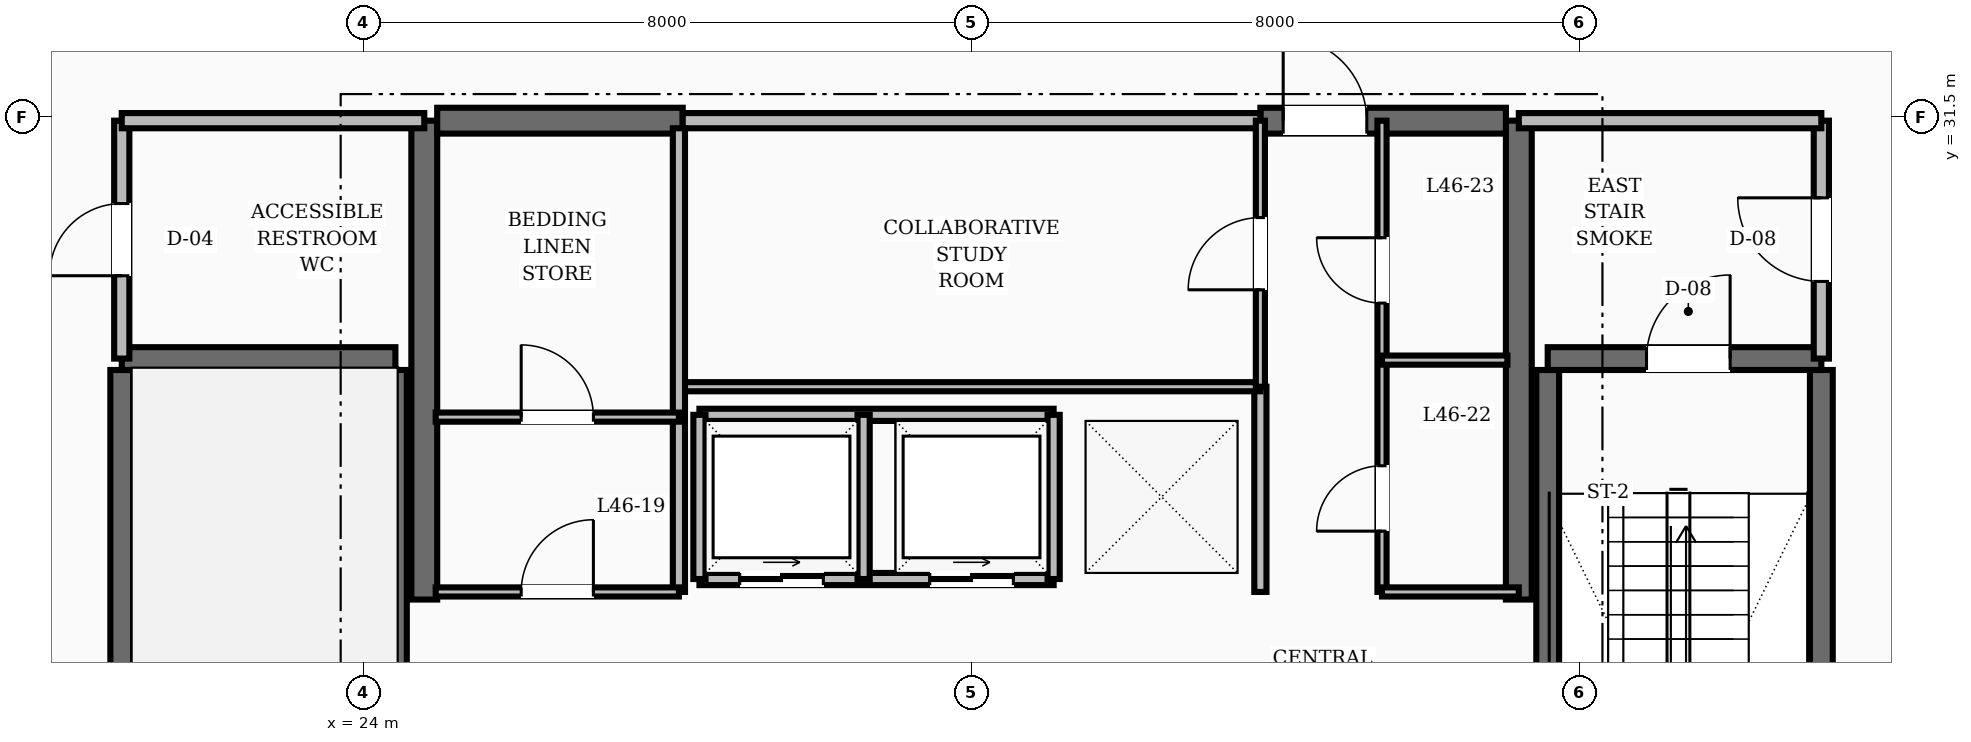
"""IFC4 building model, lengths in metres.
Left out: names, types, materials, properties, quantities, classifications, styles, units other than length and angle.
Written with IfcOpenShell. Run it as: python <this file> out.ifc"""

import sys

from ifc_helpers import new_model, si_unit, direction, frame, frame_2d, origin, place, context, subcontext, project, spatial, rectangle, extrude, element, fill, save


model = new_model("IFC4")
c1 = context("Model", 3, precision=1e-05, world=origin(), true_north=direction((0.0, 1.0)))
c2 = subcontext(c1, "Body", "Model", "MODEL_VIEW")
j1 = project(units=[si_unit("LENGTHUNIT", "METRE"), si_unit("PLANEANGLEUNIT", "RADIAN")], contexts=[c1])
p1 = place(None, origin())
s1 = spatial("IfcSite", under=j1, at=p1, CompositionType="ELEMENT")
p2 = place(p1, origin())
s2 = spatial("IfcBuilding", under=s1, at=p2, CompositionType="ELEMENT")
p3 = place(p2, frame((0.0, 0.0, 178.4)))
s3 = spatial("IfcBuildingStorey", under=s2, at=p3, CompositionType="ELEMENT", Elevation=178.4)
for number, where, z_axis, x_axis in (
    (1, (24.8, 25.15, 0.0), (0.0, 0.0, 1.0), (0.0, 1.0, 0.0)),
    (2, (39.2, 25.15, 0.0), (0.0, 0.0, 1.0), (0.0, 1.0, 0.0)),
):
    element("IfcWall", number, at=place(p3, frame(where, z_axis=z_axis, x_axis=x_axis)), inside=s3, PredefinedType="SHEAR", context=c2, shape_type="SweptSolid", body=[
        extrude(rectangle(XDim=6.3, YDim=0.34, at=frame_2d((3.15, 0.0))), origin(), (0.0, 0.0, 1.0), 3.6),
    ])
p4 = place(p3, frame((24.97, 31.45, 0.0), z_axis=(0.0, 0.0, 1.0), x_axis=(1.0, 0.0, 0.0)))
e3 = element("IfcWall", 3, at=p4, inside=s3, PredefinedType="SHEAR", context=c2, shape_type="SweptSolid", body=[
    extrude(rectangle(XDim=3.23, YDim=0.34, at=frame_2d((1.615, 0.0))), origin(), (0.0, 0.0, 1.0), 3.6),
])
p5 = place(p3, frame((35.8, 31.45, 0.0), z_axis=(0.0, 0.0, 1.0), x_axis=(1.0, 0.0, 0.0)))
e4 = element("IfcWall", 4, at=p5, inside=s3, PredefinedType="SHEAR", context=c2, shape_type="SweptSolid", body=[
    extrude(rectangle(XDim=3.23, YDim=0.34, at=frame_2d((1.615, 0.0))), origin(), (0.0, 0.0, 1.0), 3.6),
])
p6 = place(p5, frame((0.3, 0.0, 0.0)))
e5 = element("IfcOpeningElement", 5, at=p6, cuts=e4, PredefinedType="OPENING", context=c2, shape_type="SweptSolid", body=[
    extrude(rectangle(XDim=1.1, YDim=2.1, at=frame_2d((0.55, 1.05))), frame((0.0, 0.18, 0.0), z_axis=(0.0, -1.0, 0.0), x_axis=(1.0, 0.0, 0.0)), (0.0, 0.0, 1.0), 0.36),
])
for number, where, z_axis, x_axis in (
    (6, (20.82, 19.43, 0.0), (0.0, 0.0, 1.0), (0.0, 1.0, 0.0)),
    (7, (24.42, 19.43, 0.0), (0.0, 0.0, 1.0), (0.0, 1.0, 0.0)),
):
    element("IfcWall", number, at=place(p3, frame(where, z_axis=z_axis, x_axis=x_axis)), inside=s3, PredefinedType="SHEAR", context=c2, shape_type="SweptSolid", body=[
        extrude(rectangle(XDim=8.74, YDim=0.3, at=frame_2d((4.37, 0.0))), origin(), (0.0, 0.0, 1.0), 3.6),
    ])
p7 = place(p3, frame((20.82, 28.32, 0.0), z_axis=(0.0, 0.0, 1.0), x_axis=(1.0, 0.0, 0.0)))
e8 = element("IfcWall", 8, at=p7, inside=s3, PredefinedType="SHEAR", context=c2, shape_type="SweptSolid", body=[
    extrude(rectangle(XDim=3.6, YDim=0.3, at=frame_2d((1.8, 0.0))), origin(), (0.0, 0.0, 1.0), 3.6),
])
for number, where, z_axis, x_axis in (
    (9, (43.18, 19.43, 0.0), (0.0, 0.0, 1.0), (0.0, 1.0, 0.0)),
    (10, (39.58, 19.43, 0.0), (0.0, 0.0, 1.0), (0.0, 1.0, 0.0)),
):
    element("IfcWall", number, at=place(p3, frame(where, z_axis=z_axis, x_axis=x_axis)), inside=s3, PredefinedType="SHEAR", context=c2, shape_type="SweptSolid", body=[
        extrude(rectangle(XDim=8.74, YDim=0.3, at=frame_2d((4.37, 0.0))), origin(), (0.0, 0.0, 1.0), 3.6),
    ])
p8 = place(p3, frame((39.58, 28.32, 0.0), z_axis=(0.0, 0.0, 1.0), x_axis=(1.0, 0.0, 0.0)))
e11 = element("IfcWall", 11, at=p8, inside=s3, PredefinedType="SHEAR", context=c2, shape_type="SweptSolid", body=[
    extrude(rectangle(XDim=3.6, YDim=0.3, at=frame_2d((1.8, 0.0))), origin(), (0.0, 0.0, 1.0), 3.6),
])
p9 = place(p8, frame((1.3, 0.0, 0.0)))
e12 = element("IfcOpeningElement", 12, at=p9, cuts=e11, PredefinedType="OPENING", context=c2, shape_type="SweptSolid", body=[
    extrude(rectangle(XDim=1.1, YDim=2.1, at=frame_2d((0.55, 1.05))), frame((0.0, 0.16, 0.0), z_axis=(0.0, -1.0, 0.0), x_axis=(1.0, 0.0, 0.0)), (0.0, 0.0, 1.0), 0.32),
])
p10 = place(p3, frame((43.18, 28.32, 0.0), z_axis=(0.0, 0.0, 1.0), x_axis=(0.0, 1.0, 0.0)))
e13 = element("IfcWall", 13, at=p10, inside=s3, PredefinedType="SOLIDWALL", context=c2, shape_type="SweptSolid", body=[
    extrude(rectangle(XDim=3.13, YDim=0.2, at=frame_2d((1.565, 0.0))), origin(), (0.0, 0.0, 1.0), 2.8),
])
p11 = place(p10, frame((1.015, 0.0, 0.0)))
e14 = element("IfcOpeningElement", 14, at=p11, cuts=e13, PredefinedType="OPENING", context=c2, shape_type="SweptSolid", body=[
    extrude(rectangle(XDim=1.1, YDim=2.1, at=frame_2d((0.55, 1.05))), frame((0.0, 0.11, 0.0), z_axis=(0.0, -1.0, 0.0), x_axis=(1.0, 0.0, 0.0)), (0.0, 0.0, 1.0), 0.22),
])
p12 = place(p3, frame((39.2, 31.45, 0.0), z_axis=(0.0, 0.0, 1.0), x_axis=(1.0, 0.0, 0.0)))
e15 = element("IfcWall", 15, at=p12, inside=s3, PredefinedType="SOLIDWALL", context=c2, shape_type="SweptSolid", body=[
    extrude(rectangle(XDim=3.98, YDim=0.2, at=frame_2d((1.99, 0.0))), origin(), (0.0, 0.0, 1.0), 2.8),
])
p13 = place(p3, frame((20.82, 28.32, 0.0), z_axis=(0.0, 0.0, 1.0), x_axis=(0.0, 1.0, 0.0)))
e16 = element("IfcWall", 16, at=p13, inside=s3, PredefinedType="SOLIDWALL", context=c2, shape_type="SweptSolid", body=[
    extrude(rectangle(XDim=3.13, YDim=0.2, at=frame_2d((1.565, 0.0))), origin(), (0.0, 0.0, 1.0), 2.8),
])
p14 = place(p13, frame((1.09, 0.0, 0.0)))
e17 = element("IfcOpeningElement", 17, at=p14, cuts=e16, PredefinedType="OPENING", context=c2, shape_type="SweptSolid", body=[
    extrude(rectangle(XDim=0.95, YDim=2.1, at=frame_2d((0.475, 1.05))), frame((0.0, 0.11, 0.0), z_axis=(0.0, -1.0, 0.0), x_axis=(1.0, 0.0, 0.0)), (0.0, 0.0, 1.0), 0.22),
])
p15 = place(p3, frame((20.82, 31.45, 0.0), z_axis=(0.0, 0.0, 1.0), x_axis=(1.0, 0.0, 0.0)))
e18 = element("IfcWall", 18, at=p15, inside=s3, PredefinedType="SOLIDWALL", context=c2, shape_type="SweptSolid", body=[
    extrude(rectangle(XDim=3.98, YDim=0.2, at=frame_2d((1.99, 0.0))), origin(), (0.0, 0.0, 1.0), 2.8),
])
p16 = place(p3, frame((35.8, 25.25, 0.0), z_axis=(0.0, 0.0, 1.0), x_axis=(0.0, 1.0, 0.0)))
e19 = element("IfcWall", 19, at=p16, inside=s3, PredefinedType="SOLIDWALL", context=c2, shape_type="SweptSolid", body=[
    extrude(rectangle(XDim=2.7, YDim=0.16, at=frame_2d((1.35, 0.0))), origin(), (0.0, 0.0, 1.0), 2.8),
])
p17 = place(p3, frame((28.42, 25.42, 0.0), z_axis=(0.0, 0.0, 1.0), x_axis=(1.0, 0.0, 0.0)))
e20 = element("IfcWall", 20, at=p17, inside=s3, PredefinedType="SOLIDWALL", context=c2, shape_type="SweptSolid", body=[
    extrude(rectangle(XDim=4.66, YDim=0.16, at=frame_2d((2.33, 0.0))), origin(), (0.0, 0.0, 1.0), 2.8),
])
p18 = place(p17, frame((0.53, 0.0, 0.0)))
e21 = element("IfcOpeningElement", 21, at=p18, cuts=e20, PredefinedType="OPENING", context=c2, shape_type="SweptSolid", body=[
    extrude(rectangle(XDim=1.1, YDim=2.15, at=frame_2d((0.55, 1.075))), frame((0.0, 0.09, 0.0), z_axis=(0.0, -1.0, 0.0), x_axis=(1.0, 0.0, 0.0)), (0.0, 0.0, 1.0), 0.18),
])
p19 = place(p17, frame((3.03, 0.0, 0.0)))
e22 = element("IfcOpeningElement", 22, at=p19, cuts=e20, PredefinedType="OPENING", context=c2, shape_type="SweptSolid", body=[
    extrude(rectangle(XDim=1.1, YDim=2.15, at=frame_2d((0.55, 1.075))), frame((0.0, 0.09, 0.0), z_axis=(0.0, -1.0, 0.0), x_axis=(1.0, 0.0, 0.0)), (0.0, 0.0, 1.0), 0.18),
])
p20 = place(p3, frame((28.42, 27.58, 0.0), z_axis=(0.0, 0.0, 1.0), x_axis=(1.0, 0.0, 0.0)))
e23 = element("IfcWall", 23, at=p20, inside=s3, PredefinedType="SOLIDWALL", context=c2, shape_type="SweptSolid", body=[
    extrude(rectangle(XDim=4.66, YDim=0.16, at=frame_2d((2.33, 0.0))), origin(), (0.0, 0.0, 1.0), 2.8),
])
for number, where, z_axis, x_axis in (
    (24, (28.42, 25.42, 0.0), (0.0, 0.0, 1.0), (0.0, 1.0, 0.0)),
    (25, (30.58, 25.42, 0.0), (0.0, 0.0, 1.0), (0.0, 1.0, 0.0)),
    (26, (33.08, 25.42, 0.0), (0.0, 0.0, 1.0), (0.0, 1.0, 0.0)),
):
    element("IfcWall", number, at=place(p3, frame(where, z_axis=z_axis, x_axis=x_axis)), inside=s3, PredefinedType="SOLIDWALL", context=c2, shape_type="SweptSolid", body=[
        extrude(rectangle(XDim=2.16, YDim=0.16, at=frame_2d((1.08, 0.0))), origin(), (0.0, 0.0, 1.0), 2.8),
    ])
p21 = place(p3, frame((28.2, 31.45, 0.0), z_axis=(0.0, 0.0, 1.0), x_axis=(1.0, 0.0, 0.0)))
e27 = element("IfcWall", 27, at=p21, inside=s3, PredefinedType="SOLIDWALL", context=c2, shape_type="SweptSolid", body=[
    extrude(rectangle(XDim=7.6, YDim=0.2, at=frame_2d((3.8, 0.0))), origin(), (0.0, 0.0, 1.0), 2.8),
])
p22 = place(p3, frame((28.2, 27.95, 0.0), z_axis=(0.0, 0.0, 1.0), x_axis=(1.0, 0.0, 0.0)))
e28 = element("IfcWall", 28, at=p22, inside=s3, PredefinedType="PARTITIONING", context=c2, shape_type="SweptSolid", body=[
    extrude(rectangle(XDim=7.6, YDim=0.12, at=frame_2d((3.8, 0.0))), origin(), (0.0, 0.0, 1.0), 2.8),
])
p23 = place(p3, frame((35.8, 27.95, 0.0), z_axis=(0.0, 0.0, 1.0), x_axis=(0.0, 1.0, 0.0)))
e29 = element("IfcWall", 29, at=p23, inside=s3, PredefinedType="PARTITIONING", context=c2, shape_type="SweptSolid", body=[
    extrude(rectangle(XDim=3.5, YDim=0.12, at=frame_2d((1.75, 0.0))), origin(), (0.0, 0.0, 1.0), 2.8),
])
p24 = place(p23, frame((1.275, 0.0, 0.0)))
e30 = element("IfcOpeningElement", 30, at=p24, cuts=e29, PredefinedType="OPENING", context=c2, shape_type="SweptSolid", body=[
    extrude(rectangle(XDim=0.95, YDim=2.1, at=frame_2d((0.475, 1.05))), frame((0.0, 0.07, 0.0), z_axis=(0.0, -1.0, 0.0), x_axis=(1.0, 0.0, 0.0)), (0.0, 0.0, 1.0), 0.14),
])
p25 = place(p3, frame((28.15, 25.25, 0.0), z_axis=(0.0, 0.0, 1.0), x_axis=(0.0, 1.0, 0.0)))
e31 = element("IfcWall", 31, at=p25, inside=s3, PredefinedType="SOLIDWALL", context=c2, shape_type="SweptSolid", body=[
    extrude(rectangle(XDim=6.1, YDim=0.16, at=frame_2d((3.05, 0.0))), origin(), (0.0, 0.0, 1.0), 2.8),
])
p26 = place(p3, frame((24.95, 25.25, 0.0), z_axis=(0.0, 0.0, 1.0), x_axis=(1.0, 0.0, 0.0)))
e32 = element("IfcWall", 32, at=p26, inside=s3, PredefinedType="PARTITIONING", context=c2, shape_type="SweptSolid", body=[
    extrude(rectangle(XDim=3.2, YDim=0.12, at=frame_2d((1.6, 0.0))), origin(), (0.0, 0.0, 1.0), 2.8),
])
p27 = place(p26, frame((1.125, 0.0, 0.0)))
e33 = element("IfcOpeningElement", 33, at=p27, cuts=e32, PredefinedType="OPENING", context=c2, shape_type="SweptSolid", body=[
    extrude(rectangle(XDim=0.95, YDim=2.1, at=frame_2d((0.475, 1.05))), frame((0.0, 0.07, 0.0), z_axis=(0.0, -1.0, 0.0), x_axis=(1.0, 0.0, 0.0)), (0.0, 0.0, 1.0), 0.14),
])
p28 = place(p3, frame((37.4, 25.25, 0.0), z_axis=(0.0, 0.0, 1.0), x_axis=(0.0, 1.0, 0.0)))
e34 = element("IfcWall", 34, at=p28, inside=s3, PredefinedType="PARTITIONING", context=c2, shape_type="SweptSolid", body=[
    extrude(rectangle(XDim=6.2, YDim=0.12, at=frame_2d((3.1, 0.0))), origin(), (0.0, 0.0, 1.0), 2.8),
])
p29 = place(p28, frame((0.8, 0.0, 0.0)))
e35 = element("IfcOpeningElement", 35, at=p29, cuts=e34, PredefinedType="OPENING", context=c2, shape_type="SweptSolid", body=[
    extrude(rectangle(XDim=0.86, YDim=2.1, at=frame_2d((0.43, 1.05))), frame((0.0, 0.07, 0.0), z_axis=(0.0, -1.0, 0.0), x_axis=(1.0, 0.0, 0.0)), (0.0, 0.0, 1.0), 0.14),
])
p30 = place(p28, frame((3.8, 0.0, 0.0)))
e36 = element("IfcOpeningElement", 36, at=p30, cuts=e34, PredefinedType="OPENING", context=c2, shape_type="SweptSolid", body=[
    extrude(rectangle(XDim=0.86, YDim=2.1, at=frame_2d((0.43, 1.05))), frame((0.0, 0.07, 0.0), z_axis=(0.0, -1.0, 0.0), x_axis=(1.0, 0.0, 0.0)), (0.0, 0.0, 1.0), 0.14),
])
p31 = place(p3, frame((37.4, 25.25, 0.0), z_axis=(0.0, 0.0, 1.0), x_axis=(1.0, 0.0, 0.0)))
e37 = element("IfcWall", 37, at=p31, inside=s3, PredefinedType="PARTITIONING", context=c2, shape_type="SweptSolid", body=[
    extrude(rectangle(XDim=1.8, YDim=0.12, at=frame_2d((0.9, 0.0))), origin(), (0.0, 0.0, 1.0), 2.8),
])
p32 = place(p3, frame((24.95, 27.55, 0.0), z_axis=(0.0, 0.0, 1.0), x_axis=(1.0, 0.0, 0.0)))
e38 = element("IfcWall", 38, at=p32, inside=s3, PredefinedType="PARTITIONING", context=c2, shape_type="SweptSolid", body=[
    extrude(rectangle(XDim=3.2, YDim=0.12, at=frame_2d((1.6, 0.0))), origin(), (0.0, 0.0, 1.0), 2.8),
])
p33 = place(p32, frame((1.125, 0.0, 0.0)))
e39 = element("IfcOpeningElement", 39, at=p33, cuts=e38, PredefinedType="OPENING", context=c2, shape_type="SweptSolid", body=[
    extrude(rectangle(XDim=0.95, YDim=2.1, at=frame_2d((0.475, 1.05))), frame((0.0, 0.07, 0.0), z_axis=(0.0, -1.0, 0.0), x_axis=(1.0, 0.0, 0.0)), (0.0, 0.0, 1.0), 0.14),
])
p34 = place(p3, frame((37.4, 28.3, 0.0), z_axis=(0.0, 0.0, 1.0), x_axis=(1.0, 0.0, 0.0)))
e40 = element("IfcWall", 40, at=p34, inside=s3, PredefinedType="PARTITIONING", context=c2, shape_type="SweptSolid", body=[
    extrude(rectangle(XDim=1.65, YDim=0.12, at=frame_2d((0.825, 0.0))), origin(), (0.0, 0.0, 1.0), 2.8),
])
p35 = place(p9, origin())
e41 = element("IfcDoor", 41, at=p35, inside=s3, OperationType="SINGLE_SWING_RIGHT", PredefinedType="DOOR", context=c2, shape_type="SweptSolid", body=[
    extrude(rectangle(XDim=1.1, YDim=2.1, at=frame_2d((0.55, 1.05))), frame((0.0, 0.025, 0.0), z_axis=(0.0, -1.0, 0.0), x_axis=(1.0, 0.0, 0.0)), (0.0, 0.0, 1.0), 0.05),
])
fill(e12, e41)
p36 = place(p11, origin())
e42 = element("IfcDoor", 42, at=p36, inside=s3, OperationType="SINGLE_SWING_RIGHT", PredefinedType="DOOR", context=c2, shape_type="SweptSolid", body=[
    extrude(rectangle(XDim=1.1, YDim=2.1, at=frame_2d((0.55, 1.05))), frame((0.0, 0.025, 0.0), z_axis=(0.0, -1.0, 0.0), x_axis=(1.0, 0.0, 0.0)), (0.0, 0.0, 1.0), 0.05),
])
fill(e14, e42)
p37 = place(p14, origin())
e43 = element("IfcDoor", 43, at=p37, inside=s3, OperationType="SINGLE_SWING_LEFT", PredefinedType="DOOR", context=c2, shape_type="SweptSolid", body=[
    extrude(rectangle(XDim=0.95, YDim=2.1, at=frame_2d((0.475, 1.05))), frame((0.0, 0.025, 0.0), z_axis=(0.0, -1.0, 0.0), x_axis=(1.0, 0.0, 0.0)), (0.0, 0.0, 1.0), 0.05),
])
fill(e17, e43)
p38 = place(p6, origin())
e44 = element("IfcDoor", 44, at=p38, inside=s3, OperationType="SINGLE_SWING_LEFT", PredefinedType="DOOR", context=c2, shape_type="SweptSolid", body=[
    extrude(rectangle(XDim=1.1, YDim=2.1, at=frame_2d((0.55, 1.05))), frame((0.0, 0.025, 0.0), z_axis=(0.0, -1.0, 0.0), x_axis=(1.0, 0.0, 0.0)), (0.0, 0.0, 1.0), 0.05),
])
fill(e5, e44)
p39 = place(p18, origin())
e45 = element("IfcDoor", 45, at=p39, inside=s3, OperationType="SLIDING_TO_RIGHT", PredefinedType="DOOR", context=c2, shape_type="SweptSolid", body=[
    extrude(rectangle(XDim=1.1, YDim=2.15, at=frame_2d((0.55, 1.075))), frame((0.0, 0.025, 0.0), z_axis=(0.0, -1.0, 0.0), x_axis=(1.0, 0.0, 0.0)), (0.0, 0.0, 1.0), 0.05),
])
fill(e21, e45)
p40 = place(p19, origin())
e46 = element("IfcDoor", 46, at=p40, inside=s3, OperationType="SLIDING_TO_RIGHT", PredefinedType="DOOR", context=c2, shape_type="SweptSolid", body=[
    extrude(rectangle(XDim=1.1, YDim=2.15, at=frame_2d((0.55, 1.075))), frame((0.0, 0.025, 0.0), z_axis=(0.0, -1.0, 0.0), x_axis=(1.0, 0.0, 0.0)), (0.0, 0.0, 1.0), 0.05),
])
fill(e22, e46)
p41 = place(p24, origin())
e47 = element("IfcDoor", 47, at=p41, inside=s3, OperationType="SINGLE_SWING_LEFT", PredefinedType="DOOR", context=c2, shape_type="SweptSolid", body=[
    extrude(rectangle(XDim=0.95, YDim=2.1, at=frame_2d((0.475, 1.05))), frame((0.0, 0.025, 0.0), z_axis=(0.0, -1.0, 0.0), x_axis=(1.0, 0.0, 0.0)), (0.0, 0.0, 1.0), 0.05),
])
fill(e30, e47)
p42 = place(p27, origin())
e48 = element("IfcDoor", 48, at=p42, inside=s3, OperationType="SINGLE_SWING_RIGHT", PredefinedType="DOOR", context=c2, shape_type="SweptSolid", body=[
    extrude(rectangle(XDim=0.95, YDim=2.1, at=frame_2d((0.475, 1.05))), frame((0.0, 0.025, 0.0), z_axis=(0.0, -1.0, 0.0), x_axis=(1.0, 0.0, 0.0)), (0.0, 0.0, 1.0), 0.05),
])
fill(e33, e48)
p43 = place(p33, origin())
e49 = element("IfcDoor", 49, at=p43, inside=s3, OperationType="SINGLE_SWING_LEFT", PredefinedType="DOOR", context=c2, shape_type="SweptSolid", body=[
    extrude(rectangle(XDim=0.95, YDim=2.1, at=frame_2d((0.475, 1.05))), frame((0.0, 0.025, 0.0), z_axis=(0.0, -1.0, 0.0), x_axis=(1.0, 0.0, 0.0)), (0.0, 0.0, 1.0), 0.05),
])
fill(e39, e49)
p44 = place(p29, origin())
e50 = element("IfcDoor", 50, at=p44, inside=s3, OperationType="SINGLE_SWING_LEFT", PredefinedType="DOOR", context=c2, shape_type="SweptSolid", body=[
    extrude(rectangle(XDim=0.86, YDim=2.1, at=frame_2d((0.43, 1.05))), frame((0.0, 0.025, 0.0), z_axis=(0.0, -1.0, 0.0), x_axis=(1.0, 0.0, 0.0)), (0.0, 0.0, 1.0), 0.05),
])
fill(e35, e50)
p45 = place(p30, origin())
e51 = element("IfcDoor", 51, at=p45, inside=s3, OperationType="SINGLE_SWING_RIGHT", PredefinedType="DOOR", context=c2, shape_type="SweptSolid", body=[
    extrude(rectangle(XDim=0.86, YDim=2.1, at=frame_2d((0.43, 1.05))), frame((0.0, 0.025, 0.0), z_axis=(0.0, -1.0, 0.0), x_axis=(1.0, 0.0, 0.0)), (0.0, 0.0, 1.0), 0.05),
])
fill(e36, e51)
save(model, sys.argv[1])
